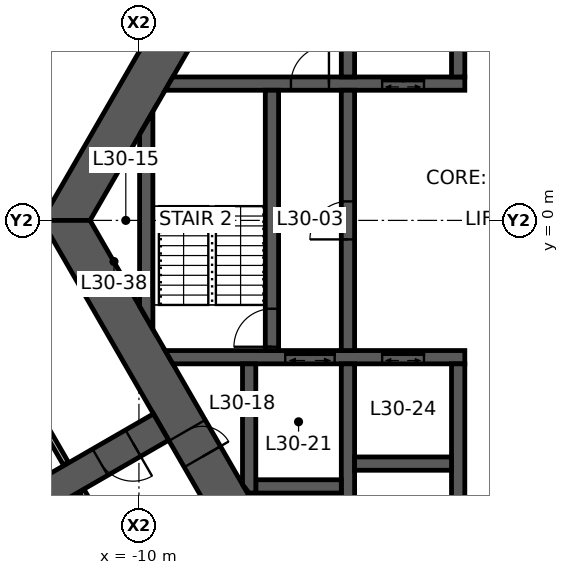
"""IFC4 building model, lengths in metres.
Left out: names, types, materials, properties, quantities, classifications, styles, units other than length and angle.
Written with IfcOpenShell. Run it as: python <this file> out.ifc"""

import sys

from ifc_helpers import new_model, si_unit, direction, frame, frame_2d, origin, place, context, subcontext, project, spatial, polyline, rectangle, outline, extrude, element, fill, save


model = new_model("IFC4")
c1 = context("Model", 3, precision=1e-05, world=origin(), true_north=direction((0.0, 1.0)))
c2 = subcontext(c1, "Body", "Model", "MODEL_VIEW")
j1 = project(units=[si_unit("LENGTHUNIT", "METRE"), si_unit("PLANEANGLEUNIT", "RADIAN")], contexts=[c1])
p1 = place(None, origin())
s1 = spatial("IfcSite", under=j1, at=p1, CompositionType="ELEMENT")
p2 = place(p1, origin())
s2 = spatial("IfcBuilding", under=s1, at=p2, CompositionType="ELEMENT")
p3 = place(p2, frame((0.0, 0.0, 119.7)))
s3 = spatial("IfcBuildingStorey", under=s2, at=p3, CompositionType="ELEMENT", Elevation=119.7)
p4 = place(p3, frame((-5.961, 10.325, 0.0), z_axis=(0.0, 0.0, 1.0), x_axis=(-0.500004296715, -0.866022923061, 0.0)))
e1 = element("IfcWall", 1, at=p4, inside=s3, PredefinedType="SHEAR", context=c2, shape_type="SweptSolid", body=[
    extrude(outline(polyline([(-0.318, -0.55), (4.494, -0.55), (5.494, -0.55), (12.24, -0.55), (11.605, 0.55), (5.494, 0.55), (4.494, 0.55), (0.318, 0.55), (-0.318, -0.55)])), origin(), (0.0, 0.0, 1.0), 3.9),
])
p5 = place(p4, frame((4.494, 0.0, 0.0)))
e2 = element("IfcOpeningElement", 2, at=p5, cuts=e1, PredefinedType="OPENING", context=c2, shape_type="SweptSolid", body=[
    extrude(rectangle(XDim=1.0, YDim=2.1, at=frame_2d((0.5, 1.05))), frame((0.0, 0.56, 0.0), z_axis=(0.0, -1.0, 0.0), x_axis=(1.0, 0.0, 0.0)), (0.0, 0.0, 1.0), 1.12),
])
p6 = place(p3, frame((-11.922, 0.0, 0.0), z_axis=(0.0, 0.0, 1.0), x_axis=(0.500004296715, -0.866022923061, 0.0)))
e3 = element("IfcWall", 3, at=p6, inside=s3, PredefinedType="SHEAR", context=c2, shape_type="SweptSolid", body=[
    extrude(outline(polyline([(-0.318, -0.55), (6.381, -0.55), (7.181, -0.55), (12.24, -0.55), (11.605, 0.55), (7.181, 0.55), (6.381, 0.55), (0.318, 0.55), (-0.318, -0.55)])), origin(), (0.0, 0.0, 1.0), 3.9),
])
p7 = place(p6, frame((6.381, 0.0, 0.0)))
e4 = element("IfcOpeningElement", 4, at=p7, cuts=e3, PredefinedType="OPENING", context=c2, shape_type="SweptSolid", body=[
    extrude(rectangle(XDim=0.8, YDim=2.1, at=frame_2d((0.4, 1.05))), frame((0.0, 0.56, 0.0), z_axis=(0.0, -1.0, 0.0), x_axis=(1.0, 0.0, 0.0)), (0.0, 0.0, 1.0), 1.12),
])
p8 = place(p3, frame((-9.418, -5.438, 0.0), z_axis=(0.0, 0.0, 1.0), x_axis=(-0.866029782078, -0.499992416496, 0.0)))
e5 = element("IfcWall", 5, at=p8, inside=s3, PredefinedType="SHEAR", context=c2, shape_type="SweptSolid", body=[
    extrude(rectangle(XDim=7.646, YDim=0.8, at=frame_2d((3.823, 0.0))), origin(), (0.0, 0.0, 1.0), 3.9),
])
p9 = place(p8, frame((0.85, 0.0, 0.0)))
e6 = element("IfcOpeningElement", 6, at=p9, cuts=e5, PredefinedType="OPENING", context=c2, shape_type="SweptSolid", body=[
    extrude(rectangle(XDim=1.0, YDim=2.1, at=frame_2d((0.5, 1.05))), frame((0.0, 0.41, 0.0), z_axis=(0.0, -1.0, 0.0), x_axis=(1.0, 0.0, 0.0)), (0.0, 0.0, 1.0), 0.82),
])
p10 = place(p3, frame((-9.209, 3.6, 0.0), z_axis=(0.0, 0.0, 1.0), x_axis=(1.0, 0.0, 0.0)))
e7 = element("IfcWall", 7, at=p10, inside=s3, PredefinedType="SHEAR", context=c2, shape_type="SweptSolid", body=[
    extrude(outline(polyline([(-0.101, -0.175), (3.209, -0.175), (4.209, -0.175), (5.609, -0.175), (6.709, -0.175), (7.784, -0.175), (7.784, 0.175), (6.709, 0.175), (5.609, 0.175), (4.209, 0.175), (3.209, 0.175), (0.101, 0.175), (-0.101, -0.175)])), origin(), (0.0, 0.0, 1.0), 3.9),
])
p11 = place(p10, frame((3.209, 0.0, 0.0)))
e8 = element("IfcOpeningElement", 8, at=p11, cuts=e7, PredefinedType="OPENING", context=c2, shape_type="SweptSolid", body=[
    extrude(rectangle(XDim=1.0, YDim=2.1, at=frame_2d((0.5, 1.05))), frame((0.0, 0.185, 0.0), z_axis=(0.0, -1.0, 0.0), x_axis=(1.0, 0.0, 0.0)), (0.0, 0.0, 1.0), 0.37),
])
p12 = place(p10, frame((5.609, 0.0, 0.0)))
e9 = element("IfcOpeningElement", 9, at=p12, cuts=e7, PredefinedType="OPENING", context=c2, shape_type="SweptSolid", body=[
    extrude(rectangle(XDim=1.1, YDim=2.1, at=frame_2d((0.55, 1.05))), frame((0.0, 0.185, 0.0), z_axis=(0.0, -1.0, 0.0), x_axis=(1.0, 0.0, 0.0)), (0.0, 0.0, 1.0), 0.37),
])
p13 = place(p3, frame((-9.209, -3.6, 0.0), z_axis=(0.0, 0.0, 1.0), x_axis=(1.0, 0.0, 0.0)))
e10 = element("IfcWall", 10, at=p13, inside=s3, PredefinedType="SHEAR", context=c2, shape_type="SweptSolid", body=[
    extrude(outline(polyline([(0.101, -0.175), (3.059, -0.175), (4.359, -0.175), (5.609, -0.175), (6.709, -0.175), (7.784, -0.175), (7.784, 0.175), (6.709, 0.175), (5.609, 0.175), (4.359, 0.175), (3.059, 0.175), (-0.101, 0.175), (0.101, -0.175)])), origin(), (0.0, 0.0, 1.0), 3.9),
])
p14 = place(p13, frame((5.609, 0.0, 0.0)))
e11 = element("IfcOpeningElement", 11, at=p14, cuts=e10, PredefinedType="OPENING", context=c2, shape_type="SweptSolid", body=[
    extrude(rectangle(XDim=1.1, YDim=2.1, at=frame_2d((0.55, 1.05))), frame((0.0, 0.185, 0.0), z_axis=(0.0, -1.0, 0.0), x_axis=(1.0, 0.0, 0.0)), (0.0, 0.0, 1.0), 0.37),
])
p15 = place(p13, frame((3.059, 0.0, 0.0)))
e12 = element("IfcOpeningElement", 12, at=p15, cuts=e10, PredefinedType="OPENING", context=c2, shape_type="SweptSolid", body=[
    extrude(rectangle(XDim=1.3, YDim=2.1, at=frame_2d((0.65, 1.05))), frame((0.0, 0.185, 0.0), z_axis=(0.0, -1.0, 0.0), x_axis=(1.0, 0.0, 0.0)), (0.0, 0.0, 1.0), 0.37),
])
p16 = place(p3, frame((-1.6, 3.775, 0.0), z_axis=(0.0, 0.0, 1.0), x_axis=(0.0, 1.0, 0.0)))
e13 = element("IfcWall", 13, at=p16, inside=s3, PredefinedType="SHEAR", context=c2, shape_type="SweptSolid", body=[
    extrude(rectangle(XDim=6.0, YDim=0.35, at=frame_2d((3.0, 0.0))), origin(), (0.0, 0.0, 1.0), 3.9),
])
p17 = place(p16, frame((3.775, 0.0, 0.0)))
e14 = element("IfcOpeningElement", 14, at=p17, cuts=e13, PredefinedType="OPENING", context=c2, shape_type="SweptSolid", body=[
    extrude(rectangle(XDim=0.9, YDim=2.1, at=frame_2d((0.45, 1.05))), frame((0.0, 0.185, 0.0), z_axis=(0.0, -1.0, 0.0), x_axis=(1.0, 0.0, 0.0)), (0.0, 0.0, 1.0), 0.37),
])
p18 = place(p3, frame((-1.6, -3.775, 0.0), z_axis=(0.0, 0.0, 1.0), x_axis=(0.0, -1.0, 0.0)))
e15 = element("IfcWall", 15, at=p18, inside=s3, PredefinedType="SHEAR", context=c2, shape_type="SweptSolid", body=[
    extrude(rectangle(XDim=6.0, YDim=0.35, at=frame_2d((3.0, 0.0))), origin(), (0.0, 0.0, 1.0), 3.9),
])
p19 = place(p18, frame((3.775, 0.0, 0.0)))
e16 = element("IfcOpeningElement", 16, at=p19, cuts=e15, PredefinedType="OPENING", context=c2, shape_type="SweptSolid", body=[
    extrude(rectangle(XDim=0.9, YDim=2.1, at=frame_2d((0.45, 1.05))), frame((0.0, 0.185, 0.0), z_axis=(0.0, -1.0, 0.0), x_axis=(1.0, 0.0, 0.0)), (0.0, 0.0, 1.0), 0.37),
])
p20 = place(p3, frame((-4.5, -3.425, 0.0), z_axis=(0.0, 0.0, 1.0), x_axis=(0.0, 1.0, 0.0)))
e17 = element("IfcWall", 17, at=p20, inside=s3, PredefinedType="SHEAR", context=c2, shape_type="SweptSolid", body=[
    extrude(rectangle(XDim=6.85, YDim=0.35, at=frame_2d((3.425, 0.0))), origin(), (0.0, 0.0, 1.0), 3.9),
])
p21 = place(p20, frame((2.925, 0.0, 0.0)))
e18 = element("IfcOpeningElement", 18, at=p21, cuts=e17, PredefinedType="OPENING", context=c2, shape_type="SweptSolid", body=[
    extrude(rectangle(XDim=1.0, YDim=2.1, at=frame_2d((0.5, 1.05))), frame((0.0, 0.185, 0.0), z_axis=(0.0, -1.0, 0.0), x_axis=(1.0, 0.0, 0.0)), (0.0, 0.0, 1.0), 0.37),
])
p22 = place(p3, frame((-6.5, -3.425, 0.0), z_axis=(0.0, 0.0, 1.0), x_axis=(0.0, 1.0, 0.0)))
e19 = element("IfcWall", 19, at=p22, inside=s3, PredefinedType="SHEAR", context=c2, shape_type="SweptSolid", body=[
    extrude(rectangle(XDim=6.85, YDim=0.35, at=frame_2d((3.425, 0.0))), origin(), (0.0, 0.0, 1.0), 3.9),
])
p23 = place(p22, frame((0.1, 0.0, 0.0)))
e20 = element("IfcOpeningElement", 20, at=p23, cuts=e19, PredefinedType="OPENING", context=c2, shape_type="SweptSolid", body=[
    extrude(rectangle(XDim=1.0, YDim=2.1, at=frame_2d((0.5, 1.05))), frame((0.0, 0.185, 0.0), z_axis=(0.0, -1.0, 0.0), x_axis=(1.0, 0.0, 0.0)), (0.0, 0.0, 1.0), 0.37),
])
for number, where, z_axis, x_axis in (
    (21, (-4.5, 3.775, 0.0), (0.0, 0.0, 1.0), (0.0, 1.0, 0.0)),
    (22, (-4.5, -3.775, 0.0), (0.0, 0.0, 1.0), (0.0, -1.0, 0.0)),
):
    element("IfcWall", number, at=place(p3, frame(where, z_axis=z_axis, x_axis=x_axis)), inside=s3, PredefinedType="SHEAR", context=c2, shape_type="SweptSolid", body=[
        extrude(rectangle(XDim=6.0, YDim=0.35, at=frame_2d((3.0, 0.0))), origin(), (0.0, 0.0, 1.0), 3.9),
    ])
p24 = place(p3, frame((-4.325, -6.4, 0.0), z_axis=(0.0, 0.0, 1.0), x_axis=(1.0, 0.0, 0.0)))
e23 = element("IfcWall", 23, at=p24, inside=s3, PredefinedType="SHEAR", context=c2, shape_type="SweptSolid", body=[
    extrude(rectangle(XDim=2.55, YDim=0.35, at=frame_2d((1.275, 0.0))), origin(), (0.0, 0.0, 1.0), 3.9),
])
p25 = place(p3, frame((-6.925, -7.0, 0.0), z_axis=(0.0, 0.0, 1.0), x_axis=(1.0, 0.0, 0.0)))
e24 = element("IfcWall", 24, at=p25, inside=s3, PredefinedType="SHEAR", context=c2, shape_type="SweptSolid", body=[
    extrude(rectangle(XDim=2.25, YDim=0.35, at=frame_2d((1.125, 0.0))), origin(), (0.0, 0.0, 1.0), 3.9),
])
p26 = place(p3, frame((-7.1, -3.775, 0.0), z_axis=(0.0, 0.0, 1.0), x_axis=(0.0, -1.0, 0.0)))
e25 = element("IfcWall", 25, at=p26, inside=s3, PredefinedType="SHEAR", context=c2, shape_type="SweptSolid", body=[
    extrude(outline(polyline([(0.0, -0.175), (3.175, -0.175), (3.4, 0.0), (3.4, 0.175), (0.0, 0.175), (0.0, -0.175)])), origin(), (0.0, 0.0, 1.0), 3.9),
])
p27 = place(p3, frame((-9.808, -2.562, 0.0), z_axis=(0.0, 0.0, 1.0), x_axis=(0.0, 1.0, 0.0)))
e26 = element("IfcWall", 26, at=p27, inside=s3, PredefinedType="SHEAR", context=c2, shape_type="SweptSolid", body=[
    extrude(outline(polyline([(-0.303, -0.175), (5.428, -0.175), (4.821, 0.175), (0.303, 0.175), (-0.303, -0.175)])), origin(), (0.0, 0.0, 1.0), 3.9),
])
p28 = place(p3, frame((-11.923, -6.399, 0.0), z_axis=(0.0, 0.0, 1.0), x_axis=(-0.499980837837, 0.866036466782, 0.0)))
e27 = element("IfcWall", 27, at=p28, inside=s3, PredefinedType="PARTITIONING", context=c2, shape_type="SweptSolid", body=[
    extrude(rectangle(XDim=7.388, YDim=0.15, at=frame_2d((3.694, 0.0))), origin(), (0.0, 0.0, 1.0), 2.35),
])
p29 = place(p28, frame((3.194, 0.0, 0.0)))
e28 = element("IfcOpeningElement", 28, at=p29, cuts=e27, PredefinedType="OPENING", context=c2, shape_type="SweptSolid", body=[
    extrude(rectangle(XDim=1.0, YDim=2.1, at=frame_2d((0.5, 1.05))), frame((0.0, 0.085, 0.0), z_axis=(0.0, -1.0, 0.0), x_axis=(1.0, 0.0, 0.0)), (0.0, 0.0, 1.0), 0.17),
])
p30 = place(p3, frame((-13.338, 3.947, 0.0), z_axis=(0.0, 0.0, 1.0), x_axis=(0.49998791073, 0.866032383415, 0.0)))
e29 = element("IfcWall", 29, at=p30, inside=s3, PredefinedType="PARTITIONING", context=c2, shape_type="SweptSolid", body=[
    extrude(rectangle(XDim=6.502, YDim=0.15, at=frame_2d((3.251, 0.0))), origin(), (0.0, 0.0, 1.0), 2.35),
])
p31 = place(p30, frame((2.751, 0.0, 0.0)))
e30 = element("IfcOpeningElement", 30, at=p31, cuts=e29, PredefinedType="OPENING", context=c2, shape_type="SweptSolid", body=[
    extrude(rectangle(XDim=1.0, YDim=2.1, at=frame_2d((0.5, 1.05))), frame((0.0, 0.085, 0.0), z_axis=(0.0, -1.0, 0.0), x_axis=(1.0, 0.0, 0.0)), (0.0, 0.0, 1.0), 0.17),
])
p32 = place(p3, frame((-10.911, -8.152, 0.0), z_axis=(0.0, 0.0, 1.0), x_axis=(-0.499841408252, 0.866116947413, 0.0)))
e31 = element("IfcWall", 31, at=p32, inside=s3, PredefinedType="PARTITIONING", context=c2, shape_type="SweptSolid", body=[
    extrude(rectangle(XDim=1.185, YDim=0.15, at=frame_2d((0.592, 0.0))), origin(), (0.0, 0.0, 1.0), 2.35),
])
p33 = place(p7, origin())
e32 = element("IfcDoor", 32, at=p33, inside=s3, OperationType="SINGLE_SWING_RIGHT", PredefinedType="DOOR", context=c2, shape_type="SweptSolid", body=[
    extrude(rectangle(XDim=0.8, YDim=2.1, at=frame_2d((0.4, 1.05))), frame((0.0, 0.025, 0.0), z_axis=(0.0, -1.0, 0.0), x_axis=(1.0, 0.0, 0.0)), (0.0, 0.0, 1.0), 0.05),
])
fill(e4, e32)
p34 = place(p21, origin())
e33 = element("IfcDoor", 33, at=p34, inside=s3, OperationType="SINGLE_SWING_LEFT", PredefinedType="DOOR", context=c2, shape_type="SweptSolid", body=[
    extrude(rectangle(XDim=1.0, YDim=2.1, at=frame_2d((0.5, 1.05))), frame((0.0, 0.025, 0.0), z_axis=(0.0, -1.0, 0.0), x_axis=(1.0, 0.0, 0.0)), (0.0, 0.0, 1.0), 0.05),
])
fill(e18, e33)
p35 = place(p23, origin())
e34 = element("IfcDoor", 34, at=p35, inside=s3, OperationType="SINGLE_SWING_LEFT", PredefinedType="DOOR", context=c2, shape_type="SweptSolid", body=[
    extrude(rectangle(XDim=1.0, YDim=2.1, at=frame_2d((0.5, 1.05))), frame((0.0, 0.025, 0.0), z_axis=(0.0, -1.0, 0.0), x_axis=(1.0, 0.0, 0.0)), (0.0, 0.0, 1.0), 0.05),
])
fill(e20, e34)
p36 = place(p11, origin())
e35 = element("IfcDoor", 35, at=p36, inside=s3, OperationType="SINGLE_SWING_RIGHT", PredefinedType="DOOR", context=c2, shape_type="SweptSolid", body=[
    extrude(rectangle(XDim=1.0, YDim=2.1, at=frame_2d((0.5, 1.05))), frame((0.0, 0.025, 0.0), z_axis=(0.0, -1.0, 0.0), x_axis=(1.0, 0.0, 0.0)), (0.0, 0.0, 1.0), 0.05),
])
fill(e8, e35)
p37 = place(p9, origin())
e36 = element("IfcDoor", 36, at=p37, inside=s3, OperationType="SINGLE_SWING_LEFT", PredefinedType="DOOR", context=c2, shape_type="SweptSolid", body=[
    extrude(rectangle(XDim=1.0, YDim=2.1, at=frame_2d((0.5, 1.05))), frame((0.0, 0.025, 0.0), z_axis=(0.0, -1.0, 0.0), x_axis=(1.0, 0.0, 0.0)), (0.0, 0.0, 1.0), 0.05),
])
fill(e6, e36)
p38 = place(p12, origin())
e37 = element("IfcDoor", 37, at=p38, inside=s3, OperationType="DOUBLE_DOOR_SLIDING", PredefinedType="DOOR", context=c2, shape_type="SweptSolid", body=[
    extrude(rectangle(XDim=1.1, YDim=2.1, at=frame_2d((0.55, 1.05))), frame((0.0, 0.025, 0.0), z_axis=(0.0, -1.0, 0.0), x_axis=(1.0, 0.0, 0.0)), (0.0, 0.0, 1.0), 0.05),
])
fill(e9, e37)
p39 = place(p14, origin())
e38 = element("IfcDoor", 38, at=p39, inside=s3, OperationType="DOUBLE_DOOR_SLIDING", PredefinedType="DOOR", context=c2, shape_type="SweptSolid", body=[
    extrude(rectangle(XDim=1.1, YDim=2.1, at=frame_2d((0.55, 1.05))), frame((0.0, 0.025, 0.0), z_axis=(0.0, -1.0, 0.0), x_axis=(1.0, 0.0, 0.0)), (0.0, 0.0, 1.0), 0.05),
])
fill(e11, e38)
p40 = place(p15, origin())
e39 = element("IfcDoor", 39, at=p40, inside=s3, OperationType="DOUBLE_DOOR_SLIDING", PredefinedType="DOOR", context=c2, shape_type="SweptSolid", body=[
    extrude(rectangle(XDim=1.3, YDim=2.1, at=frame_2d((0.65, 1.05))), frame((0.0, 0.025, 0.0), z_axis=(0.0, -1.0, 0.0), x_axis=(1.0, 0.0, 0.0)), (0.0, 0.0, 1.0), 0.05),
])
fill(e12, e39)
save(model, sys.argv[1])
